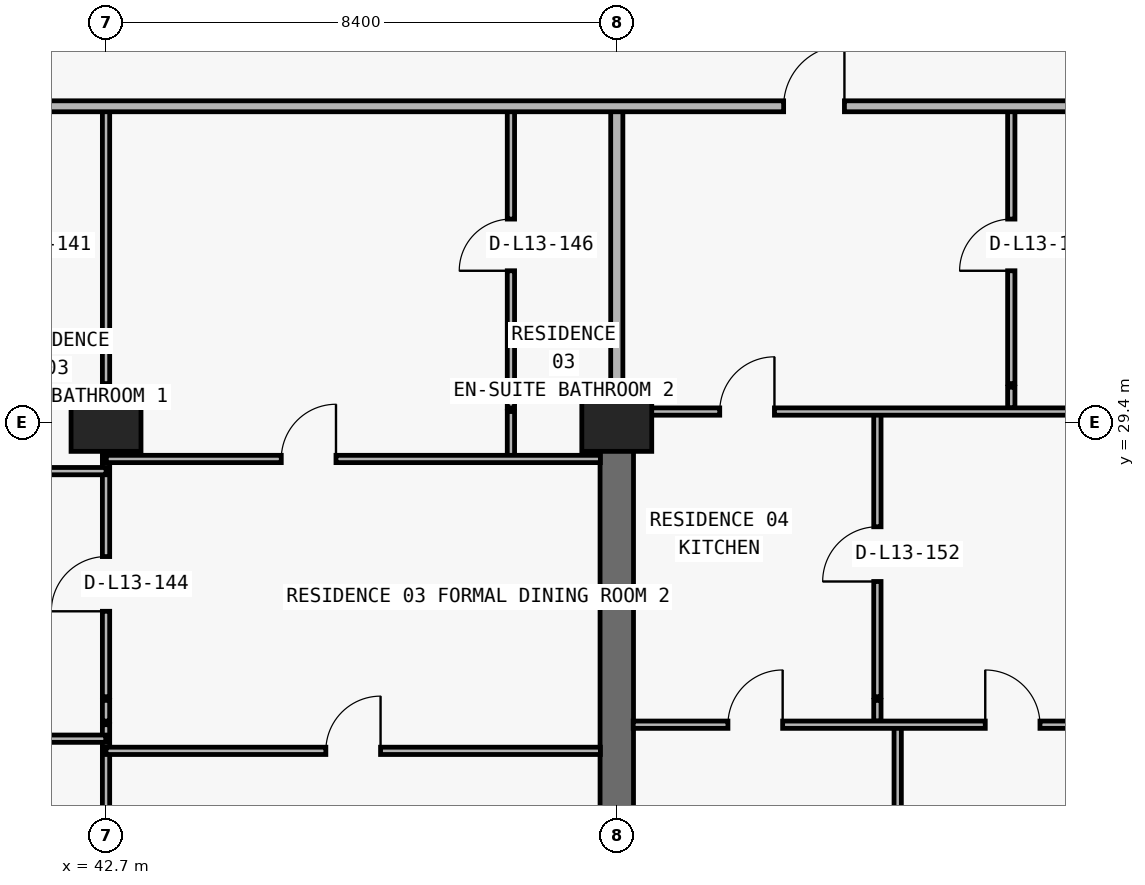
"""IFC4 building model, lengths in metres.
Left out: names, types, materials, properties, quantities, classifications, styles, units other than length and angle.
Written with IfcOpenShell. Run it as: python <this file> out.ifc"""

import sys

from ifc_helpers import new_model, si_unit, direction, frame, frame_2d, origin, origin_2d, place, context, subcontext, project, spatial, rectangle, extrude, element, fill, save


model = new_model("IFC4")
c1 = context("Model", 3, precision=1e-05, world=origin(), true_north=direction((0.0, 1.0)))
c2 = subcontext(c1, "Body", "Model", "MODEL_VIEW")
j1 = project(units=[si_unit("LENGTHUNIT", "METRE"), si_unit("PLANEANGLEUNIT", "RADIAN")], contexts=[c1])
p1 = place(None, origin())
s1 = spatial("IfcSite", under=j1, at=p1, CompositionType="ELEMENT")
p2 = place(p1, origin())
s2 = spatial("IfcBuilding", under=s1, at=p2, CompositionType="ELEMENT")
p3 = place(p2, frame((0.0, 0.0, 53.1)))
s3 = spatial("IfcBuildingStorey", under=s2, at=p3, CompositionType="ELEMENT", Elevation=53.1)
for number, where, z_axis, x_axis in (
    (1, (42.7, 29.4, 0.0), (0.0, 0.0, 1.0), (1.0, 0.0, 0.0)),
    (2, (51.1, 29.4, 0.0), (0.0, 0.0, 1.0), (1.0, 0.0, 0.0)),
):
    element("IfcColumn", number, at=place(p3, frame(where, z_axis=z_axis, x_axis=x_axis)), inside=s3, PredefinedType="COLUMN", context=c2, shape_type="SweptSolid", body=[
        extrude(rectangle(XDim=1.15, YDim=0.95, at=origin_2d()), origin(), (0.0, 0.0, 1.0), 3.05),
    ])
p4 = place(p3, frame((51.1, 20.8, 0.0), z_axis=(0.0, 0.0, 1.0), x_axis=(0.0, 1.0, 0.0)))
e3 = element("IfcWall", 3, at=p4, inside=s3, PredefinedType="SHEAR", context=c2, shape_type="SweptSolid", body=[
    extrude(rectangle(XDim=8.6, YDim=0.55, at=frame_2d((4.3, 0.0))), origin(), (0.0, 0.0, 1.0), 3.05),
])
p5 = place(p3, frame((42.7, 6.24, 0.0), z_axis=(0.0, 0.0, 1.0), x_axis=(0.0, 1.0, 0.0)))
e4 = element("IfcWall", 4, at=p5, inside=s3, PredefinedType="PARTITIONING", context=c2, shape_type="SweptSolid", body=[
    extrude(rectangle(XDim=18.19, YDim=0.12, at=frame_2d((9.095, 0.0))), origin(), (0.0, 0.0, 1.0), 2.11),
])
p6 = place(p3, frame((42.7, 24.49, 0.0), z_axis=(0.0, 0.0, 1.0), x_axis=(0.0, 1.0, 0.0)))
e5 = element("IfcWall", 5, at=p6, inside=s3, PredefinedType="PARTITIONING", context=c2, shape_type="SweptSolid", body=[
    extrude(rectangle(XDim=0.34, YDim=0.12, at=frame_2d((0.17, 0.0))), origin(), (0.0, 0.0, 1.0), 2.11),
])
p7 = place(p3, frame((42.7, 24.89, 0.0), z_axis=(0.0, 0.0, 1.0), x_axis=(0.0, 1.0, 0.0)))
e6 = element("IfcWall", 6, at=p7, inside=s3, PredefinedType="PARTITIONING", context=c2, shape_type="SweptSolid", body=[
    extrude(rectangle(XDim=4.69, YDim=0.12, at=frame_2d((2.345, 0.0))), origin(), (0.0, 0.0, 1.0), 2.11),
])
p8 = place(p7, frame((1.405, 0.0, 0.0)))
e7 = element("IfcOpeningElement", 7, at=p8, cuts=e6, PredefinedType="OPENING", context=c2, shape_type="SweptSolid", body=[
    extrude(rectangle(XDim=0.9, YDim=2.06, at=frame_2d((0.45, 1.03))), frame((0.0, 0.07, 0.0), z_axis=(0.0, -1.0, 0.0), x_axis=(1.0, 0.0, 0.0)), (0.0, 0.0, 1.0), 0.14),
])
p9 = place(p3, frame((42.7, 29.64, 0.0), z_axis=(0.0, 0.0, 1.0), x_axis=(0.0, 1.0, 0.0)))
e8 = element("IfcWall", 8, at=p9, inside=s3, PredefinedType="PARTITIONING", context=c2, shape_type="SweptSolid", body=[
    extrude(rectangle(XDim=0.34, YDim=0.12, at=frame_2d((0.17, 0.0))), origin(), (0.0, 0.0, 1.0), 2.11),
])
p10 = place(p3, frame((42.7, 30.04, 0.0), z_axis=(0.0, 0.0, 1.0), x_axis=(0.0, 1.0, 0.0)))
e9 = element("IfcWall", 9, at=p10, inside=s3, PredefinedType="PARTITIONING", context=c2, shape_type="SweptSolid", body=[
    extrude(rectangle(XDim=4.56, YDim=0.12, at=frame_2d((2.28, 0.0))), origin(), (0.0, 0.0, 1.0), 2.11),
])
p11 = place(p3, frame((49.359, 28.8, 0.0), z_axis=(0.0, 0.0, 1.0), x_axis=(0.0, 1.0, 0.0)))
e10 = element("IfcWall", 10, at=p11, inside=s3, PredefinedType="PARTITIONING", context=c2, shape_type="SweptSolid", body=[
    extrude(rectangle(XDim=0.78, YDim=0.12, at=frame_2d((0.39, 0.0))), origin(), (0.0, 0.0, 1.0), 3.05),
])
p12 = place(p3, frame((49.359, 29.64, 0.0), z_axis=(0.0, 0.0, 1.0), x_axis=(0.0, 1.0, 0.0)))
e11 = element("IfcWall", 11, at=p12, inside=s3, PredefinedType="PARTITIONING", context=c2, shape_type="SweptSolid", body=[
    extrude(rectangle(XDim=0.34, YDim=0.12, at=frame_2d((0.17, 0.0))), origin(), (0.0, 0.0, 1.0), 3.05),
])
p13 = place(p3, frame((49.359, 30.04, 0.0), z_axis=(0.0, 0.0, 1.0), x_axis=(0.0, 1.0, 0.0)))
e12 = element("IfcWall", 12, at=p13, inside=s3, PredefinedType="PARTITIONING", context=c2, shape_type="SweptSolid", body=[
    extrude(rectangle(XDim=4.56, YDim=0.12, at=frame_2d((2.28, 0.0))), origin(), (0.0, 0.0, 1.0), 3.05),
])
p14 = place(p13, frame((1.855, 0.0, 0.0)))
e13 = element("IfcOpeningElement", 13, at=p14, cuts=e12, PredefinedType="OPENING", context=c2, shape_type="SweptSolid", body=[
    extrude(rectangle(XDim=0.85, YDim=2.1, at=frame_2d((0.425, 1.05))), frame((0.0, 0.07, 0.0), z_axis=(0.0, -1.0, 0.0), x_axis=(1.0, 0.0, 0.0)), (0.0, 0.0, 1.0), 0.14),
])
p15 = place(p3, frame((51.1, 29.64, 0.0), z_axis=(0.0, 0.0, 1.0), x_axis=(0.0, 1.0, 0.0)))
e14 = element("IfcWall", 14, at=p15, inside=s3, PredefinedType="PARTITIONING", context=c2, shape_type="SweptSolid", body=[
    extrude(rectangle(XDim=0.34, YDim=0.2, at=frame_2d((0.17, 0.0))), origin(), (0.0, 0.0, 1.0), 2.335),
])
p16 = place(p3, frame((51.1, 30.04, 0.0), z_axis=(0.0, 0.0, 1.0), x_axis=(0.0, 1.0, 0.0)))
e15 = element("IfcWall", 15, at=p16, inside=s3, PredefinedType="PARTITIONING", context=c2, shape_type="SweptSolid", body=[
    extrude(rectangle(XDim=4.56, YDim=0.2, at=frame_2d((2.28, 0.0))), origin(), (0.0, 0.0, 1.0), 2.335),
])
p17 = place(p3, frame((55.386, 24.49, 0.0), z_axis=(0.0, 0.0, 1.0), x_axis=(0.0, 1.0, 0.0)))
e16 = element("IfcWall", 16, at=p17, inside=s3, PredefinedType="PARTITIONING", context=c2, shape_type="SweptSolid", body=[
    extrude(rectangle(XDim=0.34, YDim=0.12, at=frame_2d((0.17, 0.0))), origin(), (0.0, 0.0, 1.0), 2.423),
])
p18 = place(p3, frame((55.386, 24.89, 0.0), z_axis=(0.0, 0.0, 1.0), x_axis=(0.0, 1.0, 0.0)))
e17 = element("IfcWall", 17, at=p18, inside=s3, PredefinedType="PARTITIONING", context=c2, shape_type="SweptSolid", body=[
    extrude(rectangle(XDim=4.69, YDim=0.12, at=frame_2d((2.345, 0.0))), origin(), (0.0, 0.0, 1.0), 2.423),
])
p19 = place(p18, frame((1.895, 0.0, 0.0)))
e18 = element("IfcOpeningElement", 18, at=p19, cuts=e17, PredefinedType="OPENING", context=c2, shape_type="SweptSolid", body=[
    extrude(rectangle(XDim=0.9, YDim=2.15, at=frame_2d((0.45, 1.075))), frame((0.0, 0.07, 0.0), z_axis=(0.0, -1.0, 0.0), x_axis=(1.0, 0.0, 0.0)), (0.0, 0.0, 1.0), 0.14),
])
p20 = place(p3, frame((55.72, 6.24, 0.0), z_axis=(0.0, 0.0, 1.0), x_axis=(0.0, 1.0, 0.0)))
e19 = element("IfcWall", 19, at=p20, inside=s3, PredefinedType="PARTITIONING", context=c2, shape_type="SweptSolid", body=[
    extrude(rectangle(XDim=18.19, YDim=0.12, at=frame_2d((9.095, 0.0))), origin(), (0.0, 0.0, 1.0), 3.05),
])
p21 = place(p3, frame((57.588, 29.64, 0.0), z_axis=(0.0, 0.0, 1.0), x_axis=(0.0, 1.0, 0.0)))
e20 = element("IfcWall", 20, at=p21, inside=s3, PredefinedType="PARTITIONING", context=c2, shape_type="SweptSolid", body=[
    extrude(rectangle(XDim=0.34, YDim=0.12, at=frame_2d((0.17, 0.0))), origin(), (0.0, 0.0, 1.0), 3.05),
])
p22 = place(p3, frame((57.588, 30.04, 0.0), z_axis=(0.0, 0.0, 1.0), x_axis=(0.0, 1.0, 0.0)))
e21 = element("IfcWall", 21, at=p22, inside=s3, PredefinedType="PARTITIONING", context=c2, shape_type="SweptSolid", body=[
    extrude(rectangle(XDim=4.56, YDim=0.12, at=frame_2d((2.28, 0.0))), origin(), (0.0, 0.0, 1.0), 3.05),
])
p23 = place(p22, frame((1.855, 0.0, 0.0)))
e22 = element("IfcOpeningElement", 22, at=p23, cuts=e21, PredefinedType="OPENING", context=c2, shape_type="SweptSolid", body=[
    extrude(rectangle(XDim=0.85, YDim=2.1, at=frame_2d((0.425, 1.05))), frame((0.0, 0.07, 0.0), z_axis=(0.0, -1.0, 0.0), x_axis=(1.0, 0.0, 0.0)), (0.0, 0.0, 1.0), 0.14),
])
p24 = place(p3, frame((42.7, 24.0, 0.0), z_axis=(0.0, 0.0, 1.0), x_axis=(1.0, 0.0, 0.0)))
e23 = element("IfcWall", 23, at=p24, inside=s3, PredefinedType="PARTITIONING", context=c2, shape_type="SweptSolid", body=[
    extrude(rectangle(XDim=8.13, YDim=0.12, at=frame_2d((4.065, 0.0))), origin(), (0.0, 0.0, 1.0), 3.05),
])
p25 = place(p24, frame((3.615, 0.0, 0.0)))
e24 = element("IfcOpeningElement", 24, at=p25, cuts=e23, PredefinedType="OPENING", context=c2, shape_type="SweptSolid", body=[
    extrude(rectangle(XDim=0.9, YDim=2.15, at=frame_2d((0.45, 1.075))), frame((0.0, 0.07, 0.0), z_axis=(0.0, -1.0, 0.0), x_axis=(1.0, 0.0, 0.0)), (0.0, 0.0, 1.0), 0.14),
])
p26 = place(p3, frame((35.105, 24.2, 0.0), z_axis=(0.0, 0.0, 1.0), x_axis=(1.0, 0.0, 0.0)))
e25 = element("IfcWall", 25, at=p26, inside=s3, PredefinedType="PARTITIONING", context=c2, shape_type="SweptSolid", body=[
    extrude(rectangle(XDim=7.59, YDim=0.12, at=frame_2d((3.795, 0.0))), origin(), (0.0, 0.0, 1.0), 3.05),
])
p27 = place(p26, frame((3.345, 0.0, 0.0)))
e26 = element("IfcOpeningElement", 26, at=p27, cuts=e25, PredefinedType="OPENING", context=c2, shape_type="SweptSolid", body=[
    extrude(rectangle(XDim=0.9, YDim=2.15, at=frame_2d((0.45, 1.075))), frame((0.0, 0.07, 0.0), z_axis=(0.0, -1.0, 0.0), x_axis=(1.0, 0.0, 0.0)), (0.0, 0.0, 1.0), 0.14),
])
p28 = place(p3, frame((51.37, 24.43, 0.0), z_axis=(0.0, 0.0, 1.0), x_axis=(1.0, 0.0, 0.0)))
e27 = element("IfcWall", 27, at=p28, inside=s3, PredefinedType="PARTITIONING", context=c2, shape_type="SweptSolid", body=[
    extrude(rectangle(XDim=8.13, YDim=0.12, at=frame_2d((4.065, 0.0))), origin(), (0.0, 0.0, 1.0), 3.05),
])
p29 = place(p28, frame((1.558, 0.0, 0.0)))
e28 = element("IfcOpeningElement", 28, at=p29, cuts=e27, PredefinedType="OPENING", context=c2, shape_type="SweptSolid", body=[
    extrude(rectangle(XDim=0.9, YDim=2.15, at=frame_2d((0.45, 1.075))), frame((0.0, 0.07, 0.0), z_axis=(0.0, -1.0, 0.0), x_axis=(1.0, 0.0, 0.0)), (0.0, 0.0, 1.0), 0.14),
])
p30 = place(p28, frame((5.79, 0.0, 0.0)))
e29 = element("IfcOpeningElement", 29, at=p30, cuts=e27, PredefinedType="OPENING", context=c2, shape_type="SweptSolid", body=[
    extrude(rectangle(XDim=0.9, YDim=2.15, at=frame_2d((0.45, 1.075))), frame((0.0, 0.07, 0.0), z_axis=(0.0, -1.0, 0.0), x_axis=(1.0, 0.0, 0.0)), (0.0, 0.0, 1.0), 0.14),
])
p31 = place(p3, frame((35.1, 28.6, 0.0), z_axis=(0.0, 0.0, 1.0), x_axis=(1.0, 0.0, 0.0)))
e30 = element("IfcWall", 30, at=p31, inside=s3, PredefinedType="PARTITIONING", context=c2, shape_type="SweptSolid", body=[
    extrude(rectangle(XDim=7.6, YDim=0.12, at=frame_2d((3.8, 0.0))), origin(), (0.0, 0.0, 1.0), 3.05),
])
p32 = place(p31, frame((2.55, 0.0, 0.0)))
e31 = element("IfcOpeningElement", 31, at=p32, cuts=e30, PredefinedType="OPENING", context=c2, shape_type="SweptSolid", body=[
    extrude(rectangle(XDim=0.9, YDim=2.15, at=frame_2d((0.45, 1.075))), frame((0.0, 0.07, 0.0), z_axis=(0.0, -1.0, 0.0), x_axis=(1.0, 0.0, 0.0)), (0.0, 0.0, 1.0), 0.14),
])
p33 = place(p3, frame((42.705, 28.8, 0.0), z_axis=(0.0, 0.0, 1.0), x_axis=(1.0, 0.0, 0.0)))
e32 = element("IfcWall", 32, at=p33, inside=s3, PredefinedType="PARTITIONING", context=c2, shape_type="SweptSolid", body=[
    extrude(rectangle(XDim=8.125, YDim=0.12, at=frame_2d((4.062, 0.0))), origin(), (0.0, 0.0, 1.0), 3.05),
])
p34 = place(p33, frame((2.877, 0.0, 0.0)))
e33 = element("IfcOpeningElement", 33, at=p34, cuts=e32, PredefinedType="OPENING", context=c2, shape_type="SweptSolid", body=[
    extrude(rectangle(XDim=0.9, YDim=2.15, at=frame_2d((0.45, 1.075))), frame((0.0, 0.07, 0.0), z_axis=(0.0, -1.0, 0.0), x_axis=(1.0, 0.0, 0.0)), (0.0, 0.0, 1.0), 0.14),
])
p35 = place(p3, frame((51.1, 29.58, 0.0), z_axis=(0.0, 0.0, 1.0), x_axis=(1.0, 0.0, 0.0)))
e34 = element("IfcWall", 34, at=p35, inside=s3, PredefinedType="PARTITIONING", context=c2, shape_type="SweptSolid", body=[
    extrude(rectangle(XDim=8.4, YDim=0.12, at=frame_2d((4.2, 0.0))), origin(), (0.0, 0.0, 1.0), 2.11),
])
p36 = place(p35, frame((1.693, 0.0, 0.0)))
e35 = element("IfcOpeningElement", 35, at=p36, cuts=e34, PredefinedType="OPENING", context=c2, shape_type="SweptSolid", body=[
    extrude(rectangle(XDim=0.9, YDim=2.06, at=frame_2d((0.45, 1.03))), frame((0.0, 0.07, 0.0), z_axis=(0.0, -1.0, 0.0), x_axis=(1.0, 0.0, 0.0)), (0.0, 0.0, 1.0), 0.14),
])
p37 = place(p3, frame((5.105, 34.6, 0.0), z_axis=(0.0, 0.0, 1.0), x_axis=(1.0, 0.0, 0.0)))
e36 = element("IfcWall", 36, at=p37, inside=s3, PredefinedType="PARTITIONING", context=c2, shape_type="SweptSolid", body=[
    extrude(rectangle(XDim=67.595, YDim=0.18, at=frame_2d((33.797, 0.0))), origin(), (0.0, 0.0, 1.0), 3.05),
])
p38 = place(p37, frame((7.365, 0.0, 0.0)))
e37 = element("IfcOpeningElement", 37, at=p38, cuts=e36, PredefinedType="OPENING", context=c2, shape_type="SweptSolid", body=[
    extrude(rectangle(XDim=1.0, YDim=2.2, at=frame_2d((0.5, 1.1))), frame((0.0, 0.1, 0.0), z_axis=(0.0, -1.0, 0.0), x_axis=(1.0, 0.0, 0.0)), (0.0, 0.0, 1.0), 0.2),
])
p39 = place(p37, frame((15.927, 0.0, 0.0)))
e38 = element("IfcOpeningElement", 38, at=p39, cuts=e36, PredefinedType="OPENING", context=c2, shape_type="SweptSolid", body=[
    extrude(rectangle(XDim=1.0, YDim=2.2, at=frame_2d((0.5, 1.1))), frame((0.0, 0.1, 0.0), z_axis=(0.0, -1.0, 0.0), x_axis=(1.0, 0.0, 0.0)), (0.0, 0.0, 1.0), 0.2),
])
p40 = place(p37, frame((24.407, 0.0, 0.0)))
e39 = element("IfcOpeningElement", 39, at=p40, cuts=e36, PredefinedType="OPENING", context=c2, shape_type="SweptSolid", body=[
    extrude(rectangle(XDim=1.0, YDim=2.2, at=frame_2d((0.5, 1.1))), frame((0.0, 0.1, 0.0), z_axis=(0.0, -1.0, 0.0), x_axis=(1.0, 0.0, 0.0)), (0.0, 0.0, 1.0), 0.2),
])
p41 = place(p37, frame((48.739, 0.0, 0.0)))
e40 = element("IfcOpeningElement", 40, at=p41, cuts=e36, PredefinedType="OPENING", context=c2, shape_type="SweptSolid", body=[
    extrude(rectangle(XDim=1.0, YDim=2.2, at=frame_2d((0.5, 1.1))), frame((0.0, 0.1, 0.0), z_axis=(0.0, -1.0, 0.0), x_axis=(1.0, 0.0, 0.0)), (0.0, 0.0, 1.0), 0.2),
])
p42 = place(p37, frame((56.98, 0.0, 0.0)))
e41 = element("IfcOpeningElement", 41, at=p42, cuts=e36, PredefinedType="OPENING", context=c2, shape_type="SweptSolid", body=[
    extrude(rectangle(XDim=1.0, YDim=2.2, at=frame_2d((0.5, 1.1))), frame((0.0, 0.1, 0.0), z_axis=(0.0, -1.0, 0.0), x_axis=(1.0, 0.0, 0.0)), (0.0, 0.0, 1.0), 0.2),
])
p43 = place(p8, origin())
e42 = element("IfcDoor", 42, at=p43, inside=s3, OperationType="SINGLE_SWING_LEFT", PredefinedType="DOOR", context=c2, shape_type="SweptSolid", body=[
    extrude(rectangle(XDim=0.9, YDim=2.06, at=frame_2d((0.45, 1.03))), frame((0.0, 0.025, 0.0), z_axis=(0.0, -1.0, 0.0), x_axis=(1.0, 0.0, 0.0)), (0.0, 0.0, 1.0), 0.05),
])
fill(e7, e42)
p44 = place(p34, origin())
e43 = element("IfcDoor", 43, at=p44, inside=s3, OperationType="SINGLE_SWING_RIGHT", PredefinedType="DOOR", context=c2, shape_type="SweptSolid", body=[
    extrude(rectangle(XDim=0.9, YDim=2.15, at=frame_2d((0.45, 1.075))), frame((0.0, 0.025, 0.0), z_axis=(0.0, -1.0, 0.0), x_axis=(1.0, 0.0, 0.0)), (0.0, 0.0, 1.0), 0.05),
])
fill(e33, e43)
p45 = place(p14, origin())
e44 = element("IfcDoor", 44, at=p45, inside=s3, OperationType="SINGLE_SWING_LEFT", PredefinedType="DOOR", context=c2, shape_type="SweptSolid", body=[
    extrude(rectangle(XDim=0.85, YDim=2.1, at=frame_2d((0.425, 1.05))), frame((0.0, 0.025, 0.0), z_axis=(0.0, -1.0, 0.0), x_axis=(1.0, 0.0, 0.0)), (0.0, 0.0, 1.0), 0.05),
])
fill(e13, e44)
p46 = place(p25, origin())
e45 = element("IfcDoor", 45, at=p46, inside=s3, OperationType="SINGLE_SWING_RIGHT", PredefinedType="DOOR", context=c2, shape_type="SweptSolid", body=[
    extrude(rectangle(XDim=0.9, YDim=2.15, at=frame_2d((0.45, 1.075))), frame((0.0, 0.025, 0.0), z_axis=(0.0, -1.0, 0.0), x_axis=(1.0, 0.0, 0.0)), (0.0, 0.0, 1.0), 0.05),
])
fill(e24, e45)
p47 = place(p41, origin())
e46 = element("IfcDoor", 46, at=p47, inside=s3, OperationType="SINGLE_SWING_RIGHT", PredefinedType="DOOR", context=c2, shape_type="SweptSolid", body=[
    extrude(rectangle(XDim=1.0, YDim=2.2, at=frame_2d((0.5, 1.1))), frame((0.0, 0.025, 0.0), z_axis=(0.0, -1.0, 0.0), x_axis=(1.0, 0.0, 0.0)), (0.0, 0.0, 1.0), 0.05),
])
fill(e40, e46)
p48 = place(p23, origin())
e47 = element("IfcDoor", 47, at=p48, inside=s3, OperationType="SINGLE_SWING_LEFT", PredefinedType="DOOR", context=c2, shape_type="SweptSolid", body=[
    extrude(rectangle(XDim=0.85, YDim=2.1, at=frame_2d((0.425, 1.05))), frame((0.0, 0.025, 0.0), z_axis=(0.0, -1.0, 0.0), x_axis=(1.0, 0.0, 0.0)), (0.0, 0.0, 1.0), 0.05),
])
fill(e22, e47)
p49 = place(p36, origin())
e48 = element("IfcDoor", 48, at=p49, inside=s3, OperationType="SINGLE_SWING_RIGHT", PredefinedType="DOOR", context=c2, shape_type="SweptSolid", body=[
    extrude(rectangle(XDim=0.9, YDim=2.06, at=frame_2d((0.45, 1.03))), frame((0.0, 0.025, 0.0), z_axis=(0.0, -1.0, 0.0), x_axis=(1.0, 0.0, 0.0)), (0.0, 0.0, 1.0), 0.05),
])
fill(e35, e48)
p50 = place(p19, origin())
e49 = element("IfcDoor", 49, at=p50, inside=s3, OperationType="SINGLE_SWING_LEFT", PredefinedType="DOOR", context=c2, shape_type="SweptSolid", body=[
    extrude(rectangle(XDim=0.9, YDim=2.15, at=frame_2d((0.45, 1.075))), frame((0.0, 0.025, 0.0), z_axis=(0.0, -1.0, 0.0), x_axis=(1.0, 0.0, 0.0)), (0.0, 0.0, 1.0), 0.05),
])
fill(e18, e49)
p51 = place(p29, origin())
e50 = element("IfcDoor", 50, at=p51, inside=s3, OperationType="SINGLE_SWING_RIGHT", PredefinedType="DOOR", context=c2, shape_type="SweptSolid", body=[
    extrude(rectangle(XDim=0.9, YDim=2.15, at=frame_2d((0.45, 1.075))), frame((0.0, 0.025, 0.0), z_axis=(0.0, -1.0, 0.0), x_axis=(1.0, 0.0, 0.0)), (0.0, 0.0, 1.0), 0.05),
])
fill(e28, e50)
p52 = place(p30, origin())
e51 = element("IfcDoor", 51, at=p52, inside=s3, OperationType="SINGLE_SWING_LEFT", PredefinedType="DOOR", context=c2, shape_type="SweptSolid", body=[
    extrude(rectangle(XDim=0.9, YDim=2.15, at=frame_2d((0.45, 1.075))), frame((0.0, 0.025, 0.0), z_axis=(0.0, -1.0, 0.0), x_axis=(1.0, 0.0, 0.0)), (0.0, 0.0, 1.0), 0.05),
])
fill(e29, e51)
save(model, sys.argv[1])
